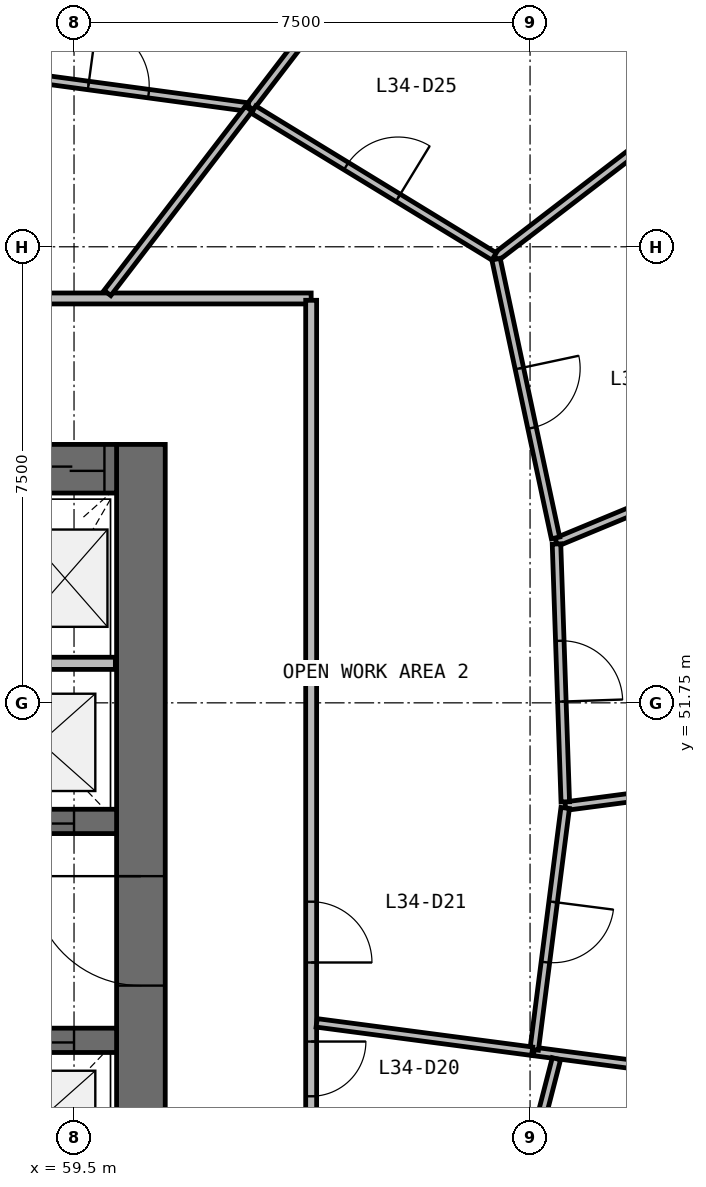
"""IFC4 building model, lengths in metres.
Left out: names, types, materials, properties, quantities, classifications, styles, units other than length and angle.
Written with IfcOpenShell. Run it as: python <this file> out.ifc"""

import sys

from ifc_helpers import new_model, si_unit, direction, frame, frame_2d, origin, place, context, subcontext, project, spatial, rectangle, extrude, source, transform, mapped, element, fill, save


model = new_model("IFC4")
c1 = context("Model", 3, precision=1e-05, world=origin(), true_north=direction((0.0, 1.0)))
c2 = subcontext(c1, "Body", "Model", "MODEL_VIEW")
j1 = project(units=[si_unit("LENGTHUNIT", "METRE"), si_unit("PLANEANGLEUNIT", "RADIAN")], contexts=[c1])
p1 = place(None, origin())
s1 = spatial("IfcSite", under=j1, at=p1, CompositionType="ELEMENT")
p2 = place(p1, origin())
s2 = spatial("IfcBuilding", under=s1, at=p2, CompositionType="ELEMENT")
p3 = place(p2, frame((0.0, 0.0, 144.8)))
s3 = spatial("IfcBuildingStorey", under=s2, at=p3, CompositionType="ELEMENT", Elevation=144.8)
p4 = place(p3, frame((60.6, 40.0, 0.0), z_axis=(0.0, 0.0, 1.0), x_axis=(0.0, 1.0, 0.0)))
e1 = element("IfcWall", 1, at=p4, inside=s3, PredefinedType="SHEAR", context=c2, shape_type="SweptSolid", body=[
    extrude(rectangle(XDim=16.0, YDim=0.8, at=frame_2d((8.0, 0.0))), origin(), (0.0, 0.0, 1.0), 3.9),
])
p5 = place(p4, frame((7.1, 0.0, 0.0)))
e2 = element("IfcOpeningElement", 2, at=p5, cuts=e1, PredefinedType="OPENING", context=c2, shape_type="SweptSolid", body=[
    extrude(rectangle(XDim=1.8, YDim=2.1, at=frame_2d((0.9, 1.05))), frame((0.0, 0.41, 0.0), z_axis=(0.0, -1.0, 0.0), x_axis=(1.0, 0.0, 0.0)), (0.0, 0.0, 1.0), 0.82),
])
p6 = place(p3, frame((60.2, 55.6, 0.0), z_axis=(0.0, 0.0, 1.0), x_axis=(-1.0, 0.0, 0.0)))
e3 = element("IfcWall", 3, at=p6, inside=s3, PredefinedType="SHEAR", context=c2, shape_type="SweptSolid", body=[
    extrude(rectangle(XDim=16.4, YDim=0.8, at=frame_2d((8.2, 0.0))), origin(), (0.0, 0.0, 1.0), 3.9),
])
p7 = place(p6, frame((0.2, 0.0, 0.0)))
e4 = element("IfcOpeningElement", 4, at=p7, cuts=e3, PredefinedType="OPENING", context=c2, shape_type="SweptSolid", body=[
    extrude(rectangle(XDim=1.1, YDim=2.1, at=frame_2d((0.55, 1.05))), frame((0.0, 0.41, 0.0), z_axis=(0.0, -1.0, 0.0), x_axis=(1.0, 0.0, 0.0)), (0.0, 0.0, 1.0), 0.82),
])
p8 = place(p6, frame((10.1, 0.0, 0.0)))
e5 = element("IfcOpeningElement", 5, at=p8, cuts=e3, PredefinedType="OPENING", context=c2, shape_type="SweptSolid", body=[
    extrude(rectangle(XDim=1.2, YDim=2.1, at=frame_2d((0.6, 1.05))), frame((0.0, 0.41, 0.0), z_axis=(0.0, -1.0, 0.0), x_axis=(1.0, 0.0, 0.0)), (0.0, 0.0, 1.0), 0.82),
])
p9 = place(p6, frame((7.05, 0.0, 0.0)))
e6 = element("IfcOpeningElement", 6, at=p9, cuts=e3, PredefinedType="OPENING", context=c2, shape_type="SweptSolid", body=[
    extrude(rectangle(XDim=1.1, YDim=2.1, at=frame_2d((0.55, 1.05))), frame((0.0, 0.41, 0.0), z_axis=(0.0, -1.0, 0.0), x_axis=(1.0, 0.0, 0.0)), (0.0, 0.0, 1.0), 0.82),
])
p10 = place(p3, frame((43.8, 49.8, 0.0), z_axis=(0.0, 0.0, 1.0), x_axis=(1.0, 0.0, 0.0)))
e7 = element("IfcWall", 7, at=p10, inside=s3, PredefinedType="SHEAR", context=c2, shape_type="SweptSolid", body=[
    extrude(rectangle(XDim=16.4, YDim=0.4, at=frame_2d((8.2, 0.0))), origin(), (0.0, 0.0, 1.0), 3.9),
])
p11 = place(p10, frame((9.6, 0.0, 0.0)))
e8 = element("IfcOpeningElement", 8, at=p11, cuts=e7, PredefinedType="OPENING", context=c2, shape_type="SweptSolid", body=[
    extrude(rectangle(XDim=1.1, YDim=2.1, at=frame_2d((0.55, 1.05))), frame((0.0, 0.21, 0.0), z_axis=(0.0, -1.0, 0.0), x_axis=(1.0, 0.0, 0.0)), (0.0, 0.0, 1.0), 0.42),
])
p12 = place(p10, frame((12.1, 0.0, 0.0)))
e9 = element("IfcOpeningElement", 9, at=p12, cuts=e7, PredefinedType="OPENING", context=c2, shape_type="SweptSolid", body=[
    extrude(rectangle(XDim=1.1, YDim=2.1, at=frame_2d((0.55, 1.05))), frame((0.0, 0.21, 0.0), z_axis=(0.0, -1.0, 0.0), x_axis=(1.0, 0.0, 0.0)), (0.0, 0.0, 1.0), 0.42),
])
p13 = place(p10, frame((14.6, 0.0, 0.0)))
e10 = element("IfcOpeningElement", 10, at=p13, cuts=e7, PredefinedType="OPENING", context=c2, shape_type="SweptSolid", body=[
    extrude(rectangle(XDim=1.1, YDim=2.1, at=frame_2d((0.55, 1.05))), frame((0.0, 0.21, 0.0), z_axis=(0.0, -1.0, 0.0), x_axis=(1.0, 0.0, 0.0)), (0.0, 0.0, 1.0), 0.42),
])
p14 = place(p10, frame((2.05, 0.0, 0.0)))
e11 = element("IfcOpeningElement", 11, at=p14, cuts=e7, PredefinedType="OPENING", context=c2, shape_type="SweptSolid", body=[
    extrude(rectangle(XDim=0.9, YDim=2.1, at=frame_2d((0.45, 1.05))), frame((0.0, 0.21, 0.0), z_axis=(0.0, -1.0, 0.0), x_axis=(1.0, 0.0, 0.0)), (0.0, 0.0, 1.0), 0.42),
])
p15 = place(p10, frame((5.05, 0.0, 0.0)))
e12 = element("IfcOpeningElement", 12, at=p15, cuts=e7, PredefinedType="OPENING", context=c2, shape_type="SweptSolid", body=[
    extrude(rectangle(XDim=0.9, YDim=2.1, at=frame_2d((0.45, 1.05))), frame((0.0, 0.21, 0.0), z_axis=(0.0, -1.0, 0.0), x_axis=(1.0, 0.0, 0.0)), (0.0, 0.0, 1.0), 0.42),
])
p16 = place(p10, frame((7.65, 0.0, 0.0)))
e13 = element("IfcOpeningElement", 13, at=p16, cuts=e7, PredefinedType="OPENING", context=c2, shape_type="SweptSolid", body=[
    extrude(rectangle(XDim=0.9, YDim=2.1, at=frame_2d((0.45, 1.05))), frame((0.0, 0.21, 0.0), z_axis=(0.0, -1.0, 0.0), x_axis=(1.0, 0.0, 0.0)), (0.0, 0.0, 1.0), 0.42),
])
p17 = place(p3, frame((43.8, 46.2, 0.0), z_axis=(0.0, 0.0, 1.0), x_axis=(1.0, 0.0, 0.0)))
e14 = element("IfcWall", 14, at=p17, inside=s3, PredefinedType="SHEAR", context=c2, shape_type="SweptSolid", body=[
    extrude(rectangle(XDim=16.4, YDim=0.4, at=frame_2d((8.2, 0.0))), origin(), (0.0, 0.0, 1.0), 3.9),
])
p18 = place(p17, frame((9.6, 0.0, 0.0)))
e15 = element("IfcOpeningElement", 15, at=p18, cuts=e14, PredefinedType="OPENING", context=c2, shape_type="SweptSolid", body=[
    extrude(rectangle(XDim=1.1, YDim=2.1, at=frame_2d((0.55, 1.05))), frame((0.0, 0.21, 0.0), z_axis=(0.0, -1.0, 0.0), x_axis=(1.0, 0.0, 0.0)), (0.0, 0.0, 1.0), 0.42),
])
p19 = place(p17, frame((12.1, 0.0, 0.0)))
e16 = element("IfcOpeningElement", 16, at=p19, cuts=e14, PredefinedType="OPENING", context=c2, shape_type="SweptSolid", body=[
    extrude(rectangle(XDim=1.1, YDim=2.1, at=frame_2d((0.55, 1.05))), frame((0.0, 0.21, 0.0), z_axis=(0.0, -1.0, 0.0), x_axis=(1.0, 0.0, 0.0)), (0.0, 0.0, 1.0), 0.42),
])
p20 = place(p17, frame((14.6, 0.0, 0.0)))
e17 = element("IfcOpeningElement", 17, at=p20, cuts=e14, PredefinedType="OPENING", context=c2, shape_type="SweptSolid", body=[
    extrude(rectangle(XDim=1.1, YDim=2.1, at=frame_2d((0.55, 1.05))), frame((0.0, 0.21, 0.0), z_axis=(0.0, -1.0, 0.0), x_axis=(1.0, 0.0, 0.0)), (0.0, 0.0, 1.0), 0.42),
])
p21 = place(p17, frame((3.45, 0.0, 0.0)))
e18 = element("IfcOpeningElement", 18, at=p21, cuts=e14, PredefinedType="OPENING", context=c2, shape_type="SweptSolid", body=[
    extrude(rectangle(XDim=0.9, YDim=2.1, at=frame_2d((0.45, 1.05))), frame((0.0, 0.21, 0.0), z_axis=(0.0, -1.0, 0.0), x_axis=(1.0, 0.0, 0.0)), (0.0, 0.0, 1.0), 0.42),
])
p22 = place(p17, frame((7.65, 0.0, 0.0)))
e19 = element("IfcOpeningElement", 19, at=p22, cuts=e14, PredefinedType="OPENING", context=c2, shape_type="SweptSolid", body=[
    extrude(rectangle(XDim=0.9, YDim=2.1, at=frame_2d((0.45, 1.05))), frame((0.0, 0.21, 0.0), z_axis=(0.0, -1.0, 0.0), x_axis=(1.0, 0.0, 0.0)), (0.0, 0.0, 1.0), 0.42),
])
p23 = place(p3, frame((60.18, 52.4, 0.0), z_axis=(0.0, 0.0, 1.0), x_axis=(-1.0, 0.0, 0.0)))
e20 = element("IfcWall", 20, at=p23, inside=s3, PredefinedType="SOLIDWALL", context=c2, shape_type="SweptSolid", body=[
    extrude(rectangle(XDim=1.65, YDim=0.2, at=frame_2d((0.825, 0.0))), origin(), (0.0, 0.0, 1.0), 3.58),
])
p24 = place(p3, frame((40.6, 58.4, 0.0), z_axis=(0.0, 0.0, 1.0), x_axis=(1.0, 0.0, 0.0)))
e21 = element("IfcWall", 21, at=p24, inside=s3, PredefinedType="PARTITIONING", context=c2, shape_type="SweptSolid", body=[
    extrude(rectangle(XDim=22.8, YDim=0.18, at=frame_2d((11.4, 0.0))), origin(), (0.0, 0.0, 1.0), 2.88),
])
p25 = place(p24, frame((12.95, 0.0, 0.0)))
e22 = element("IfcOpeningElement", 22, at=p25, cuts=e21, PredefinedType="OPENING", context=c2, shape_type="SweptSolid", body=[
    extrude(rectangle(XDim=1.0, YDim=2.1, at=frame_2d((0.5, 1.05))), frame((0.0, 0.1, 0.0), z_axis=(0.0, -1.0, 0.0), x_axis=(1.0, 0.0, 0.0)), (0.0, 0.0, 1.0), 0.2),
])
p26 = place(p24, frame((10.95, 0.0, 0.0)))
e23 = element("IfcOpeningElement", 23, at=p26, cuts=e21, PredefinedType="OPENING", context=c2, shape_type="SweptSolid", body=[
    extrude(rectangle(XDim=1.0, YDim=2.1, at=frame_2d((0.5, 1.05))), frame((0.0, 0.1, 0.0), z_axis=(0.0, -1.0, 0.0), x_axis=(1.0, 0.0, 0.0)), (0.0, 0.0, 1.0), 0.2),
])
p27 = place(p24, frame((8.75, 0.0, 0.0)))
e24 = element("IfcOpeningElement", 24, at=p27, cuts=e21, PredefinedType="OPENING", context=c2, shape_type="SweptSolid", body=[
    extrude(rectangle(XDim=1.0, YDim=2.1, at=frame_2d((0.5, 1.05))), frame((0.0, 0.1, 0.0), z_axis=(0.0, -1.0, 0.0), x_axis=(1.0, 0.0, 0.0)), (0.0, 0.0, 1.0), 0.2),
])
p28 = place(p3, frame((63.4, 58.37, 0.0), z_axis=(0.0, 0.0, 1.0), x_axis=(0.0, -1.0, 0.0)))
e25 = element("IfcWall", 25, at=p28, inside=s3, PredefinedType="PARTITIONING", context=c2, shape_type="SweptSolid", body=[
    extrude(rectangle(XDim=20.74, YDim=0.18, at=frame_2d((10.37, 0.0))), origin(), (0.0, 0.0, 1.0), 2.88),
])
p29 = place(p28, frame((15.39, 0.0, 0.0)))
e26 = element("IfcOpeningElement", 26, at=p29, cuts=e25, PredefinedType="OPENING", context=c2, shape_type="SweptSolid", body=[
    extrude(rectangle(XDim=0.9, YDim=2.1, at=frame_2d((0.45, 1.05))), frame((0.0, 0.1, 0.0), z_axis=(0.0, -1.0, 0.0), x_axis=(1.0, 0.0, 0.0)), (0.0, 0.0, 1.0), 0.2),
])
p30 = place(p28, frame((12.19, 0.0, 0.0)))
e27 = element("IfcOpeningElement", 27, at=p30, cuts=e25, PredefinedType="OPENING", context=c2, shape_type="SweptSolid", body=[
    extrude(rectangle(XDim=0.9, YDim=2.1, at=frame_2d((0.45, 1.05))), frame((0.0, 0.1, 0.0), z_axis=(0.0, -1.0, 0.0), x_axis=(1.0, 0.0, 0.0)), (0.0, 0.0, 1.0), 0.2),
])
p31 = place(p28, frame((9.89, 0.0, 0.0)))
e28 = element("IfcOpeningElement", 28, at=p31, cuts=e25, PredefinedType="OPENING", context=c2, shape_type="SweptSolid", body=[
    extrude(rectangle(XDim=1.0, YDim=2.1, at=frame_2d((0.5, 1.05))), frame((0.0, 0.1, 0.0), z_axis=(0.0, -1.0, 0.0), x_axis=(1.0, 0.0, 0.0)), (0.0, 0.0, 1.0), 0.2),
])
p32 = place(p3, frame((67.582, 50.052, 0.0), z_axis=(0.0, 0.0, 1.0), x_axis=(0.991449691786, 0.130489496352, 0.0)))
e29 = element("IfcWall", 29, at=p32, inside=s3, PredefinedType="PARTITIONING", context=c2, shape_type="SweptSolid", body=[
    extrude(rectangle(XDim=7.041, YDim=0.14, at=frame_2d((3.52, 0.0))), origin(), (0.0, 0.0, 1.0), 2.88),
])
p33 = place(p3, frame((67.434, 54.393, 0.0), z_axis=(0.0, 0.0, 1.0), x_axis=(0.923882268554, 0.382676826907, 0.0)))
e30 = element("IfcWall", 30, at=p33, inside=s3, PredefinedType="PARTITIONING", context=c2, shape_type="SweptSolid", body=[
    extrude(rectangle(XDim=7.032, YDim=0.14, at=frame_2d((3.516, 0.0))), origin(), (0.0, 0.0, 1.0), 2.88),
])
p34 = place(p3, frame((57.863, 62.156, 0.0), z_axis=(0.0, 0.0, 1.0), x_axis=(0.382700710287, 0.923872375572, 0.0)))
e31 = element("IfcWall", 31, at=p34, inside=s3, PredefinedType="PARTITIONING", context=c2, shape_type="SweptSolid", body=[
    extrude(rectangle(XDim=6.612, YDim=0.14, at=frame_2d((3.306, 0.0))), origin(), (0.0, 0.0, 1.0), 2.88),
])
p35 = place(p3, frame((62.392, 61.543, 0.0), z_axis=(0.0, 0.0, 1.0), x_axis=(0.608777226721, 0.793341218031, 0.0)))
e32 = element("IfcWall", 32, at=p35, inside=s3, PredefinedType="PARTITIONING", context=c2, shape_type="SweptSolid", body=[
    extrude(rectangle(XDim=6.449, YDim=0.14, at=frame_2d((3.224, 0.0))), origin(), (0.0, 0.0, 1.0), 2.88),
])
p36 = place(p3, frame((66.434, 59.075, 0.0), z_axis=(0.0, 0.0, 1.0), x_axis=(0.793363364339, 0.608748365193, 0.0)))
e33 = element("IfcWall", 33, at=p36, inside=s3, PredefinedType="PARTITIONING", context=c2, shape_type="SweptSolid", body=[
    extrude(rectangle(XDim=6.292, YDim=0.14, at=frame_2d((3.146, 0.0))), origin(), (0.0, 0.0, 1.0), 2.88),
])
p37 = place(p3, frame((72.941, 45.243, 0.0), z_axis=(0.0, 0.0, 1.0), x_axis=(-0.991450229477, 0.13048541095, 0.0)))
e34 = element("IfcWall", 34, at=p37, inside=s3, PredefinedType="PARTITIONING", context=c2, shape_type="SweptSolid", body=[
    extrude(rectangle(XDim=5.927, YDim=0.14, at=frame_2d((2.964, 0.0))), origin(), (0.0, 0.0, 1.0), 2.88),
])
p38 = place(p37, frame((2.477, 0.0, 0.0)))
e35 = element("IfcOpeningElement", 35, at=p38, cuts=e34, PredefinedType="OPENING", context=c2, shape_type="SweptSolid", body=[
    extrude(rectangle(XDim=1.0, YDim=2.1, at=frame_2d((0.5, 1.05))), frame((0.0, 0.08, 0.0), z_axis=(0.0, -1.0, 0.0), x_axis=(1.0, 0.0, 0.0)), (0.0, 0.0, 1.0), 0.16),
])
p39 = place(p3, frame((66.44, 59.046, 0.0), z_axis=(0.0, 0.0, 1.0), x_axis=(0.208821144004, -0.977953848511, 0.0)))
e36 = element("IfcWall", 36, at=p39, inside=s3, PredefinedType="PARTITIONING", context=c2, shape_type="SweptSolid", body=[
    extrude(rectangle(XDim=4.687, YDim=0.14, at=frame_2d((2.344, 0.0))), origin(), (0.0, 0.0, 1.0), 2.88),
])
p40 = place(p39, frame((1.837, 0.0, 0.0)))
e37 = element("IfcOpeningElement", 37, at=p40, cuts=e36, PredefinedType="OPENING", context=c2, shape_type="SweptSolid", body=[
    extrude(rectangle(XDim=1.0, YDim=2.1, at=frame_2d((0.5, 1.05))), frame((0.0, 0.08, 0.0), z_axis=(0.0, -1.0, 0.0), x_axis=(1.0, 0.0, 0.0)), (0.0, 0.0, 1.0), 0.16),
])
p41 = place(p3, frame((62.452, 61.507, 0.0), z_axis=(0.0, 0.0, 1.0), x_axis=(0.853479672846, -0.521126134481, 0.0)))
e38 = element("IfcWall", 38, at=p41, inside=s3, PredefinedType="PARTITIONING", context=c2, shape_type="SweptSolid", body=[
    extrude(rectangle(XDim=4.635, YDim=0.14, at=frame_2d((2.318, 0.0))), origin(), (0.0, 0.0, 1.0), 2.88),
])
p42 = place(p41, frame((1.785, 0.0, 0.0)))
e39 = element("IfcOpeningElement", 39, at=p42, cuts=e38, PredefinedType="OPENING", context=c2, shape_type="SweptSolid", body=[
    extrude(rectangle(XDim=1.0, YDim=2.1, at=frame_2d((0.5, 1.05))), frame((0.0, 0.08, 0.0), z_axis=(0.0, -1.0, 0.0), x_axis=(1.0, 0.0, 0.0)), (0.0, 0.0, 1.0), 0.16),
])
p43 = place(p3, frame((57.935, 62.146, 0.0), z_axis=(0.0, 0.0, 1.0), x_axis=(0.990988117401, -0.133949808402, 0.0)))
e40 = element("IfcWall", 40, at=p43, inside=s3, PredefinedType="PARTITIONING", context=c2, shape_type="SweptSolid", body=[
    extrude(rectangle(XDim=4.467, YDim=0.14, at=frame_2d((2.234, 0.0))), origin(), (0.0, 0.0, 1.0), 2.88),
])
p44 = place(p43, frame((1.817, 0.0, 0.0)))
e41 = element("IfcOpeningElement", 41, at=p44, cuts=e40, PredefinedType="OPENING", context=c2, shape_type="SweptSolid", body=[
    extrude(rectangle(XDim=1.0, YDim=2.1, at=frame_2d((0.5, 1.05))), frame((0.0, 0.08, 0.0), z_axis=(0.0, -1.0, 0.0), x_axis=(1.0, 0.0, 0.0)), (0.0, 0.0, 1.0), 0.16),
])
p45 = place(p3, frame((67.435, 54.363, 0.0), z_axis=(0.0, 0.0, 1.0), x_axis=(0.034058056345, -0.999419856116, 0.0)))
e42 = element("IfcWall", 42, at=p45, inside=s3, PredefinedType="PARTITIONING", context=c2, shape_type="SweptSolid", body=[
    extrude(rectangle(XDim=4.244, YDim=0.14, at=frame_2d((2.122, 0.0))), origin(), (0.0, 0.0, 1.0), 2.88),
])
p46 = place(p45, frame((1.594, 0.0, 0.0)))
e43 = element("IfcOpeningElement", 43, at=p46, cuts=e42, PredefinedType="OPENING", context=c2, shape_type="SweptSolid", body=[
    extrude(rectangle(XDim=1.0, YDim=2.1, at=frame_2d((0.5, 1.05))), frame((0.0, 0.08, 0.0), z_axis=(0.0, -1.0, 0.0), x_axis=(1.0, 0.0, 0.0)), (0.0, 0.0, 1.0), 0.16),
])
p47 = place(p3, frame((66.443, 42.05, 0.0), z_axis=(0.0, 0.0, 1.0), x_axis=(0.249469158669, 0.968382743998, 0.0)))
e44 = element("IfcWall", 44, at=p47, inside=s3, PredefinedType="PARTITIONING", context=c2, shape_type="SweptSolid", body=[
    extrude(rectangle(XDim=3.973, YDim=0.14, at=frame_2d((1.987, 0.0))), origin(), (0.0, 0.0, 1.0), 2.88),
])
p48 = place(p3, frame((67.578, 50.021, 0.0), z_axis=(0.0, 0.0, 1.0), x_axis=(-0.127198124576, -0.991877329666, 0.0)))
e45 = element("IfcWall", 45, at=p48, inside=s3, PredefinedType="PARTITIONING", context=c2, shape_type="SweptSolid", body=[
    extrude(rectangle(XDim=4.008, YDim=0.14, at=frame_2d((2.004, 0.0))), origin(), (0.0, 0.0, 1.0), 2.88),
])
p49 = place(p48, frame((1.558, 0.0, 0.0)))
e46 = element("IfcOpeningElement", 46, at=p49, cuts=e45, PredefinedType="OPENING", context=c2, shape_type="SweptSolid", body=[
    extrude(rectangle(XDim=1.0, YDim=2.1, at=frame_2d((0.5, 1.05))), frame((0.0, 0.08, 0.0), z_axis=(0.0, -1.0, 0.0), x_axis=(1.0, 0.0, 0.0)), (0.0, 0.0, 1.0), 0.16),
])
p50 = place(p3, frame((60.049, 58.49, 0.0), z_axis=(0.0, 0.0, 1.0), x_axis=(0.608730820987, 0.793376825714, 0.0)))
e47 = element("IfcWall", 47, at=p50, inside=s3, PredefinedType="PARTITIONING", context=c2, shape_type="SweptSolid", body=[
    extrude(rectangle(XDim=3.819, YDim=0.14, at=frame_2d((1.909, 0.0))), origin(), (0.0, 0.0, 1.0), 2.88),
])
p51 = place(p3, frame((63.49, 46.487, 0.0), z_axis=(0.0, 0.0, 1.0), x_axis=(0.991447785983, -0.130503975686, 0.0)))
e48 = element("IfcWall", 48, at=p51, inside=s3, PredefinedType="PARTITIONING", context=c2, shape_type="SweptSolid", body=[
    extrude(rectangle(XDim=3.575, YDim=0.14, at=frame_2d((1.788, 0.0))), origin(), (0.0, 0.0, 1.0), 2.88),
])
m1 = source(origin(), c2, "Body", "SweptSolid", [
    extrude(rectangle(XDim=1.8, YDim=2.1, at=frame_2d((0.9, 1.05))), frame((0.0, 0.025, 0.0), z_axis=(0.0, -1.0, 0.0), x_axis=(1.0, 0.0, 0.0)), (0.0, 0.0, 1.0), 0.05),
])
p52 = place(p5, origin())
e49 = element("IfcDoor", 49, at=p52, inside=s3, OperationType="SINGLE_SWING_RIGHT", PredefinedType="DOOR", context=c2, shape_type="MappedRepresentation", body=[
    mapped(m1, transform((0.0, 0.0, 0.0), scale=1.0)),
])
fill(e2, e49)
m2 = source(origin(), c2, "Body", "SweptSolid", [
    extrude(rectangle(XDim=1.1, YDim=2.1, at=frame_2d((0.55, 1.05))), frame((0.0, 0.025, 0.0), z_axis=(0.0, -1.0, 0.0), x_axis=(1.0, 0.0, 0.0)), (0.0, 0.0, 1.0), 0.05),
])
p53 = place(p13, origin())
e50 = element("IfcDoor", 50, at=p53, inside=s3, OperationType="DOUBLE_DOOR_SLIDING", PredefinedType="USERDEFINED", context=c2, shape_type="MappedRepresentation", body=[
    mapped(m2, transform((0.0, 0.0, 0.0), scale=1.0)),
])
fill(e10, e50)
p54 = place(p20, origin())
e51 = element("IfcDoor", 51, at=p54, inside=s3, OperationType="DOUBLE_DOOR_SLIDING", PredefinedType="USERDEFINED", context=c2, shape_type="MappedRepresentation", body=[
    mapped(m2, transform((0.0, 0.0, 0.0), scale=1.0)),
])
fill(e17, e51)
p55 = place(p7, origin())
e52 = element("IfcDoor", 52, at=p55, inside=s3, OperationType="DOUBLE_DOOR_SLIDING", PredefinedType="USERDEFINED", context=c2, shape_type="MappedRepresentation", body=[
    mapped(m2, transform((0.0, 0.0, 0.0), scale=1.0)),
])
fill(e4, e52)
m3 = source(origin(), c2, "Body", "SweptSolid", [
    extrude(rectangle(XDim=0.9, YDim=2.1, at=frame_2d((0.45, 1.05))), frame((0.0, 0.025, 0.0), z_axis=(0.0, -1.0, 0.0), x_axis=(1.0, 0.0, 0.0)), (0.0, 0.0, 1.0), 0.05),
])
p56 = place(p30, origin())
e53 = element("IfcDoor", 53, at=p56, inside=s3, OperationType="SINGLE_SWING_LEFT", PredefinedType="DOOR", context=c2, shape_type="MappedRepresentation", body=[
    mapped(m3, transform((0.0, 0.0, 0.0), scale=1.0)),
])
fill(e27, e53)
m4 = source(origin(), c2, "Body", "SweptSolid", [
    extrude(rectangle(XDim=1.0, YDim=2.1, at=frame_2d((0.5, 1.05))), frame((0.0, 0.025, 0.0), z_axis=(0.0, -1.0, 0.0), x_axis=(1.0, 0.0, 0.0)), (0.0, 0.0, 1.0), 0.05),
])
p57 = place(p31, origin())
e54 = element("IfcDoor", 54, at=p57, inside=s3, OperationType="SINGLE_SWING_RIGHT", PredefinedType="DOOR", context=c2, shape_type="MappedRepresentation", body=[
    mapped(m4, transform((0.0, 0.0, 0.0), scale=1.0)),
])
fill(e28, e54)
p58 = place(p49, origin())
e55 = element("IfcDoor", 55, at=p58, inside=s3, OperationType="SINGLE_SWING_LEFT", PredefinedType="DOOR", context=c2, shape_type="MappedRepresentation", body=[
    mapped(m4, transform((0.0, 0.0, 0.0), scale=1.0)),
])
fill(e46, e55)
p59 = place(p46, origin())
e56 = element("IfcDoor", 56, at=p59, inside=s3, OperationType="SINGLE_SWING_RIGHT", PredefinedType="DOOR", context=c2, shape_type="MappedRepresentation", body=[
    mapped(m4, transform((0.0, 0.0, 0.0), scale=1.0)),
])
fill(e43, e56)
p60 = place(p40, origin())
e57 = element("IfcDoor", 57, at=p60, inside=s3, OperationType="SINGLE_SWING_LEFT", PredefinedType="DOOR", context=c2, shape_type="MappedRepresentation", body=[
    mapped(m4, transform((0.0, 0.0, 0.0), scale=1.0)),
])
fill(e37, e57)
p61 = place(p42, origin())
e58 = element("IfcDoor", 58, at=p61, inside=s3, OperationType="SINGLE_SWING_RIGHT", PredefinedType="DOOR", context=c2, shape_type="MappedRepresentation", body=[
    mapped(m4, transform((0.0, 0.0, 0.0), scale=1.0)),
])
fill(e39, e58)
p62 = place(p44, origin())
e59 = element("IfcDoor", 59, at=p62, inside=s3, OperationType="SINGLE_SWING_LEFT", PredefinedType="DOOR", context=c2, shape_type="MappedRepresentation", body=[
    mapped(m4, transform((0.0, 0.0, 0.0), scale=1.0)),
])
fill(e41, e59)
save(model, sys.argv[1])
